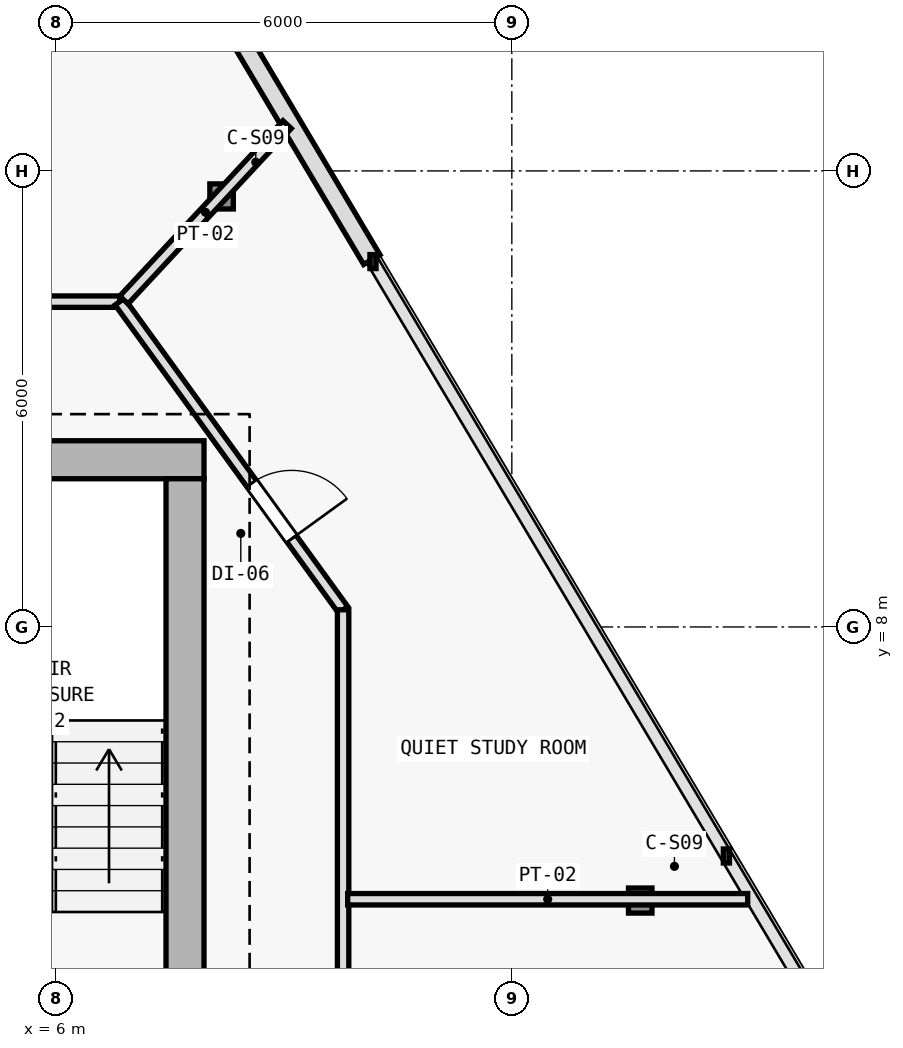
"""IFC4 building model, lengths in metres.
Left out: names, types, materials, properties, quantities, classifications, styles, units other than length and angle.
Written with IfcOpenShell. Run it as: python <this file> out.ifc"""

import sys

from ifc_helpers import new_model, si_unit, direction, frame, frame_2d, origin, origin_2d, place, context, subcontext, project, spatial, rectangle, i_section, extrude, element, fill, save


model = new_model("IFC4")
c1 = context("Model", 3, precision=1e-05, world=origin(), true_north=direction((0.0, 1.0)))
c2 = subcontext(c1, "Body", "Model", "MODEL_VIEW")
j1 = project(units=[si_unit("LENGTHUNIT", "METRE"), si_unit("PLANEANGLEUNIT", "RADIAN")], contexts=[c1])
p1 = place(None, origin())
s1 = spatial("IfcSite", under=j1, at=p1, CompositionType="ELEMENT")
p2 = place(p1, origin())
s2 = spatial("IfcBuilding", under=s1, at=p2, CompositionType="ELEMENT")
p3 = place(p2, frame((0.0, 0.0, 265.2)))
s3 = spatial("IfcBuildingStorey", under=s2, at=p3, CompositionType="ELEMENT", Elevation=265.2)
p4 = place(p3, frame((7.7, 10.2, 0.0), z_axis=(0.0, 0.0, 1.0), x_axis=(1.0, 0.0, 0.0)))
e1 = element("IfcColumn", 1, at=p4, inside=s3, PredefinedType="COLUMN", context=c2, shape_type="SweptSolid", body=[
    extrude(i_section(OverallWidth=0.374, OverallDepth=0.372, WebThickness=0.012, FlangeThickness=0.02, FilletRadius=0.015, at=origin_2d()), origin(), (0.0, 0.0, 1.0), 3.6),
])
p5 = place(p3, frame((13.689, 4.401, 0.006), z_axis=(-0.018907326549, 0.00952167524, 0.999775900241), x_axis=(-0.449781931574, -0.893138406984, 0.0)))
e2 = element("IfcColumn", 2, at=p5, inside=s3, PredefinedType="COLUMN", context=c2, shape_type="SweptSolid", body=[
    extrude(i_section(OverallWidth=0.309, OverallDepth=0.33, WebThickness=0.011, FlangeThickness=0.019, FilletRadius=0.027, at=origin_2d()), origin(), (0.0, 0.0, 1.0), 3.59),
])
p6 = place(p3, frame((8.181, 13.664, 0.006), z_axis=(-0.011767855299, -0.002516824544, 0.999927588966), x_axis=(0.209143047003, -0.977885057607, 0.0)))
e3 = element("IfcColumn", 3, at=p6, inside=s3, PredefinedType="COLUMN", context=c2, shape_type="SweptSolid", body=[
    extrude(i_section(OverallWidth=0.309, OverallDepth=0.33, WebThickness=0.011, FlangeThickness=0.019, FilletRadius=0.027, at=origin_2d()), origin(), (0.0, 0.0, 1.0), 3.589),
])
p7 = place(p3, frame((5.24, 21.103, 0.0), z_axis=(0.0, 0.0, 1.0), x_axis=(0.511088566076, -0.859528055171, 0.0)))
e4 = element("IfcWall", 4, at=p7, inside=s3, PredefinedType="SOLIDWALL", context=c2, shape_type="SweptSolid", body=[
    extrude(rectangle(XDim=9.622, YDim=0.25, at=frame_2d((4.811, 0.0))), origin(), (0.0, 0.0, 1.0), 3.35),
])
p8 = place(p7, frame((4.361, 0.0, 0.62)))
e5 = element("IfcOpeningElement", 5, at=p8, cuts=e4, PredefinedType="OPENING", context=c2, shape_type="SweptSolid", body=[
    extrude(rectangle(XDim=0.9, YDim=1.6, at=frame_2d((0.45, 0.8))), frame((0.0, 0.135, 0.0), z_axis=(0.0, -1.0, 0.0), x_axis=(1.0, 0.0, 0.0)), (0.0, 0.0, 1.0), 0.27),
])
p9 = place(p3, frame((7.95, 10.2, 0.0), z_axis=(0.0, 0.0, 1.0), x_axis=(-1.0, 0.0, 0.0)))
e6 = element("IfcWall", 6, at=p9, inside=s3, PredefinedType="SHEAR", context=c2, shape_type="SweptSolid", body=[
    extrude(rectangle(XDim=15.9, YDim=0.5, at=frame_2d((7.95, 0.0))), origin(), (0.0, 0.0, 1.0), 3.35),
])
p10 = place(p9, frame((4.4, 0.0, 0.0)))
e7 = element("IfcOpeningElement", 7, at=p10, cuts=e6, PredefinedType="OPENING", context=c2, shape_type="SweptSolid", body=[
    extrude(rectangle(XDim=1.1, YDim=2.15, at=frame_2d((0.55, 1.075))), frame((0.0, 0.26, 0.0), z_axis=(0.0, -1.0, 0.0), x_axis=(1.0, 0.0, 0.0)), (0.0, 0.0, 1.0), 0.52),
])
p11 = place(p3, frame((7.7, 9.95, 0.0), z_axis=(0.0, 0.0, 1.0), x_axis=(0.0, -1.0, 0.0)))
e8 = element("IfcWall", 8, at=p11, inside=s3, PredefinedType="SHEAR", context=c2, shape_type="SweptSolid", body=[
    extrude(rectangle(XDim=19.1, YDim=0.5, at=frame_2d((9.55, 0.0))), origin(), (0.0, 0.0, 1.0), 3.35),
])
p12 = place(p3, frame((-6.841, 12.28, 0.0), z_axis=(0.0, 0.0, 1.0), x_axis=(1.0, 0.0, 0.0)))
e9 = element("IfcWall", 9, at=p12, inside=s3, PredefinedType="PARTITIONING", context=c2, shape_type="SweptSolid", body=[
    extrude(rectangle(XDim=13.682, YDim=0.15, at=frame_2d((6.841, 0.0))), origin(), (0.0, 0.0, 1.0), 3.015),
])
p13 = place(p12, frame((6.391, 0.0, 0.0)))
e10 = element("IfcOpeningElement", 10, at=p13, cuts=e9, PredefinedType="OPENING", context=c2, shape_type="SweptSolid", body=[
    extrude(rectangle(XDim=0.9, YDim=2.1, at=frame_2d((0.45, 1.05))), frame((0.0, 0.085, 0.0), z_axis=(0.0, -1.0, 0.0), x_axis=(1.0, 0.0, 0.0)), (0.0, 0.0, 1.0), 0.17),
])
p14 = place(p3, frame((6.841, 12.28, 0.0), z_axis=(0.0, 0.0, 1.0), x_axis=(0.586956386413, -0.809618552436, 0.0)))
e11 = element("IfcWall", 11, at=p14, inside=s3, PredefinedType="PARTITIONING", context=c2, shape_type="SweptSolid", body=[
    extrude(rectangle(XDim=5.008, YDim=0.15, at=frame_2d((2.504, 0.0))), origin(), (0.0, 0.0, 1.0), 2.965),
])
p15 = place(p14, frame((2.954, 0.0, 0.0)))
e12 = element("IfcOpeningElement", 12, at=p15, cuts=e11, PredefinedType="OPENING", context=c2, shape_type="SweptSolid", body=[
    extrude(rectangle(XDim=0.9, YDim=2.1, at=frame_2d((0.45, 1.05))), frame((0.0, 0.085, 0.0), z_axis=(0.0, -1.0, 0.0), x_axis=(1.0, 0.0, 0.0)), (0.0, 0.0, 1.0), 0.17),
])
p16 = place(p3, frame((9.78, 8.226, 0.0), z_axis=(0.0, 0.0, 1.0), x_axis=(0.0, -1.0, 0.0)))
e13 = element("IfcWall", 13, at=p16, inside=s3, PredefinedType="PARTITIONING", context=c2, shape_type="SweptSolid", body=[
    extrude(rectangle(XDim=19.706, YDim=0.15, at=frame_2d((9.853, 0.0))), origin(), (0.0, 0.0, 1.0), 2.825),
])
p17 = place(p16, frame((15.063, 0.0, 0.0)))
e14 = element("IfcOpeningElement", 14, at=p17, cuts=e13, PredefinedType="OPENING", context=c2, shape_type="SweptSolid", body=[
    extrude(rectangle(XDim=0.9, YDim=2.1, at=frame_2d((0.45, 1.05))), frame((0.0, 0.085, 0.0), z_axis=(0.0, -1.0, 0.0), x_axis=(1.0, 0.0, 0.0)), (0.0, 0.0, 1.0), 0.17),
])
p18 = place(p16, frame((7.203, 0.0, 0.0)))
e15 = element("IfcOpeningElement", 15, at=p18, cuts=e13, PredefinedType="OPENING", context=c2, shape_type="SweptSolid", body=[
    extrude(rectangle(XDim=0.9, YDim=2.1, at=frame_2d((0.45, 1.05))), frame((0.0, 0.085, 0.0), z_axis=(0.0, -1.0, 0.0), x_axis=(1.0, 0.0, 0.0)), (0.0, 0.0, 1.0), 0.17),
])
p19 = place(p3, frame((9.84, 4.418, 0.0), z_axis=(0.0, 0.0, 1.0), x_axis=(1.0, 0.0, 0.0)))
e16 = element("IfcWall", 16, at=p19, inside=s3, PredefinedType="PARTITIONING", context=c2, shape_type="SweptSolid", body=[
    extrude(rectangle(XDim=5.263, YDim=0.15, at=frame_2d((2.632, 0.0))), origin(), (0.0, 0.0, 1.0), 2.965),
])
p20 = place(p3, frame((6.896, 12.302, 0.0), z_axis=(0.0, 0.0, 1.0), x_axis=(0.68140422013, 0.731907295215, 0.0)))
e17 = element("IfcWall", 17, at=p20, inside=s3, PredefinedType="PARTITIONING", context=c2, shape_type="SweptSolid", body=[
    extrude(rectangle(XDim=3.152, YDim=0.15, at=frame_2d((1.576, 0.0))), origin(), (0.0, 0.0, 1.0), 3.015),
])
p21 = place(p15, origin())
e18 = element("IfcDoor", 18, at=p21, inside=s3, OperationType="SINGLE_SWING_RIGHT", PredefinedType="DOOR", context=c2, shape_type="SweptSolid", body=[
    extrude(rectangle(XDim=0.9, YDim=2.1, at=frame_2d((0.45, 1.05))), frame((0.0, 0.025, 0.0), z_axis=(0.0, -1.0, 0.0), x_axis=(1.0, 0.0, 0.0)), (0.0, 0.0, 1.0), 0.05),
])
fill(e12, e18)
save(model, sys.argv[1])
